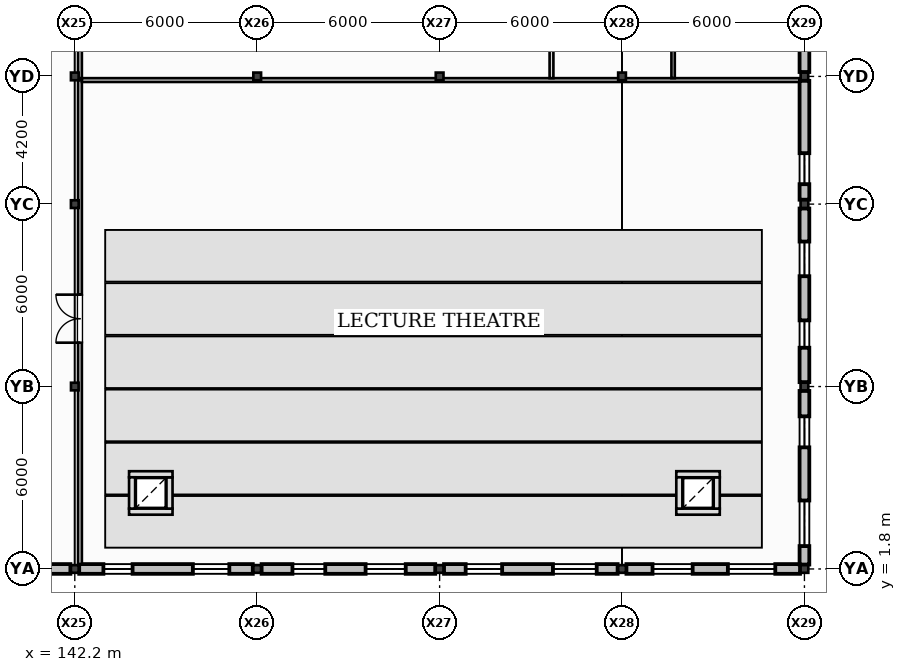
"""IFC4 building model, lengths in metres.
Left out: names, types, materials, properties, quantities, classifications, styles, units other than length and angle.
Written with IfcOpenShell. Run it as: python <this file> out.ifc"""

import sys

from ifc_helpers import new_model, si_unit, direction, frame, frame_2d, origin, origin_2d, place, context, subcontext, project, spatial, rectangle, hollow_rectangle, i_section, extrude, element, fill, save


model = new_model("IFC4")
c1 = context("Model", 3, precision=1e-05, world=origin(), true_north=direction((0.0, 1.0)))
c2 = subcontext(c1, "Body", "Model", "MODEL_VIEW")
j1 = project(units=[si_unit("LENGTHUNIT", "METRE"), si_unit("PLANEANGLEUNIT", "RADIAN")], contexts=[c1])
p1 = place(None, origin())
s1 = spatial("IfcSite", under=j1, at=p1, CompositionType="ELEMENT")
p2 = place(p1, origin())
s2 = spatial("IfcBuilding", under=s1, at=p2, CompositionType="ELEMENT")
p3 = place(p2, frame((0.0, 0.0, 6.0)))
s3 = spatial("IfcBuildingStorey", under=s2, at=p3, CompositionType="ELEMENT", Elevation=6.0)
p4 = place(p3, frame((142.2, 1.8, 0.0), z_axis=(0.0, 0.0, 1.0), x_axis=(1.0, 0.0, 0.0)))
e1 = element("IfcColumn", 1, at=p4, inside=s3, PredefinedType="COLUMN", context=c2, shape_type="SweptSolid", body=[
    extrude(i_section(OverallWidth=0.254, OverallDepth=0.253, WebThickness=0.009, FlangeThickness=0.014, at=origin_2d()), origin(), (0.0, 0.0, 1.0), 4.0),
])
p5 = place(p3, frame((142.2, 7.8, 0.0), z_axis=(0.0, 0.0, 1.0), x_axis=(1.0, 0.0, 0.0)))
e2 = element("IfcColumn", 2, at=p5, inside=s3, PredefinedType="COLUMN", context=c2, shape_type="SweptSolid", body=[
    extrude(hollow_rectangle(XDim=0.25, YDim=0.25, WallThickness=0.012, at=origin_2d()), origin(), (0.0, 0.0, 1.0), 4.0),
])
for number, where, z_axis, x_axis in (
    (3, (142.2, 13.8, 0.0), (0.0, 0.0, 1.0), (1.0, 0.0, 0.0)),
    (4, (142.2, 18.0, 0.0), (0.0, 0.0, 1.0), (1.0, 0.0, 0.0)),
    (5, (148.2, 1.8, 0.0), (0.0, 0.0, 1.0), (1.0, 0.0, 0.0)),
    (6, (148.2, 18.0, 0.0), (0.0, 0.0, 1.0), (1.0, 0.0, 0.0)),
    (7, (154.2, 1.8, 0.0), (0.0, 0.0, 1.0), (1.0, 0.0, 0.0)),
    (8, (154.2, 18.0, 0.0), (0.0, 0.0, 1.0), (1.0, 0.0, 0.0)),
    (9, (160.2, 1.8, 0.0), (0.0, 0.0, 1.0), (1.0, 0.0, 0.0)),
    (10, (160.2, 18.0, 0.0), (0.0, 0.0, 1.0), (1.0, 0.0, 0.0)),
    (11, (166.2, 1.8, 0.0), (0.0, 0.0, 1.0), (1.0, 0.0, 0.0)),
    (12, (166.2, 7.8, 0.0), (0.0, 0.0, 1.0), (1.0, 0.0, 0.0)),
    (13, (166.2, 13.8, 0.0), (0.0, 0.0, 1.0), (1.0, 0.0, 0.0)),
):
    element("IfcColumn", number, at=place(p3, frame(where, z_axis=z_axis, x_axis=x_axis)), inside=s3, PredefinedType="COLUMN", context=c2, shape_type="SweptSolid", body=[
        extrude(i_section(OverallWidth=0.254, OverallDepth=0.253, WebThickness=0.009, FlangeThickness=0.014, at=origin_2d()), origin(), (0.0, 0.0, 1.0), 4.0),
    ])
p6 = place(p3, frame((166.2, 18.0, 0.0), z_axis=(0.0, 0.0, 1.0), x_axis=(1.0, 0.0, 0.0)))
e14 = element("IfcColumn", 14, at=p6, inside=s3, PredefinedType="COLUMN", context=c2, shape_type="SweptSolid", body=[
    extrude(hollow_rectangle(XDim=0.25, YDim=0.25, WallThickness=0.012, at=origin_2d()), origin(), (0.0, 0.0, 1.0), 4.0),
])
p7 = place(p3, frame((136.345, 1.8, 0.0), z_axis=(0.0, 0.0, 1.0), x_axis=(1.0, 0.0, 0.0)))
e15 = element("IfcWall", 15, at=p7, inside=s3, PredefinedType="STANDARD", context=c2, shape_type="SweptSolid", body=[
    extrude(rectangle(XDim=5.71, YDim=0.32, at=frame_2d((2.855, 0.0))), origin(), (0.0, 0.0, 1.0), 3.223),
])
p8 = place(p7, frame((3.504, 0.0, 0.86)))
e16 = element("IfcOpeningElement", 16, at=p8, cuts=e15, PredefinedType="OPENING", context=c2, shape_type="SweptSolid", body=[
    extrude(rectangle(XDim=1.08, YDim=1.08, at=frame_2d((0.54, 0.54))), frame((0.0, 0.17, 0.0), z_axis=(0.0, -1.0, 0.0), x_axis=(1.0, 0.0, 0.0)), (0.0, 0.0, 1.0), 0.34),
])
p9 = place(p3, frame((142.345, 1.8, 0.0), z_axis=(0.0, 0.0, 1.0), x_axis=(1.0, 0.0, 0.0)))
e17 = element("IfcWall", 17, at=p9, inside=s3, PredefinedType="STANDARD", context=c2, shape_type="SweptSolid", body=[
    extrude(rectangle(XDim=5.71, YDim=0.32, at=frame_2d((2.855, 0.0))), origin(), (0.0, 0.0, 1.0), 4.0),
])
p10 = place(p9, frame((0.796, 0.0, 1.28)))
e18 = element("IfcOpeningElement", 18, at=p10, cuts=e17, PredefinedType="OPENING", context=c2, shape_type="SweptSolid", body=[
    extrude(rectangle(XDim=0.96, YDim=0.96, at=frame_2d((0.48, 0.48))), frame((0.0, 0.17, 0.0), z_axis=(0.0, -1.0, 0.0), x_axis=(1.0, 0.0, 0.0)), (0.0, 0.0, 1.0), 0.34),
])
p11 = place(p9, frame((3.738, 0.0, 1.18)))
e19 = element("IfcOpeningElement", 19, at=p11, cuts=e17, PredefinedType="OPENING", context=c2, shape_type="SweptSolid", body=[
    extrude(rectangle(XDim=1.2, YDim=1.2, at=frame_2d((0.6, 0.6))), frame((0.0, 0.17, 0.0), z_axis=(0.0, -1.0, 0.0), x_axis=(1.0, 0.0, 0.0)), (0.0, 0.0, 1.0), 0.34),
])
p12 = place(p3, frame((148.345, 1.8, 0.0), z_axis=(0.0, 0.0, 1.0), x_axis=(1.0, 0.0, 0.0)))
e20 = element("IfcWall", 20, at=p12, inside=s3, PredefinedType="STANDARD", context=c2, shape_type="SweptSolid", body=[
    extrude(rectangle(XDim=5.71, YDim=0.32, at=frame_2d((2.855, 0.0))), origin(), (0.0, 0.0, 1.0), 4.0),
])
p13 = place(p12, frame((1.014, 0.0, 0.86)))
e21 = element("IfcOpeningElement", 21, at=p13, cuts=e20, PredefinedType="OPENING", context=c2, shape_type="SweptSolid", body=[
    extrude(rectangle(XDim=1.08, YDim=1.08, at=frame_2d((0.54, 0.54))), frame((0.0, 0.17, 0.0), z_axis=(0.0, -1.0, 0.0), x_axis=(1.0, 0.0, 0.0)), (0.0, 0.0, 1.0), 0.34),
])
p14 = place(p12, frame((3.42, 0.0, 1.42)))
e22 = element("IfcOpeningElement", 22, at=p14, cuts=e20, PredefinedType="OPENING", context=c2, shape_type="SweptSolid", body=[
    extrude(rectangle(XDim=1.32, YDim=1.32, at=frame_2d((0.66, 0.66))), frame((0.0, 0.17, 0.0), z_axis=(0.0, -1.0, 0.0), x_axis=(1.0, 0.0, 0.0)), (0.0, 0.0, 1.0), 0.34),
])
p15 = place(p3, frame((154.345, 1.8, 0.0), z_axis=(0.0, 0.0, 1.0), x_axis=(1.0, 0.0, 0.0)))
e23 = element("IfcWall", 23, at=p15, inside=s3, PredefinedType="STANDARD", context=c2, shape_type="SweptSolid", body=[
    extrude(rectangle(XDim=5.71, YDim=0.32, at=frame_2d((2.855, 0.0))), origin(), (0.0, 0.0, 1.0), 4.0),
])
p16 = place(p15, frame((0.712, 0.0, 1.18)))
e24 = element("IfcOpeningElement", 24, at=p16, cuts=e23, PredefinedType="OPENING", context=c2, shape_type="SweptSolid", body=[
    extrude(rectangle(XDim=1.2, YDim=1.2, at=frame_2d((0.6, 0.6))), frame((0.0, 0.17, 0.0), z_axis=(0.0, -1.0, 0.0), x_axis=(1.0, 0.0, 0.0)), (0.0, 0.0, 1.0), 0.34),
])
p17 = place(p15, frame((3.582, 0.0, 0.96)))
e25 = element("IfcOpeningElement", 25, at=p17, cuts=e23, PredefinedType="OPENING", context=c2, shape_type="SweptSolid", body=[
    extrude(rectangle(XDim=1.44, YDim=1.44, at=frame_2d((0.72, 0.72))), frame((0.0, 0.17, 0.0), z_axis=(0.0, -1.0, 0.0), x_axis=(1.0, 0.0, 0.0)), (0.0, 0.0, 1.0), 0.34),
])
p18 = place(p3, frame((160.345, 1.8, 0.0), z_axis=(0.0, 0.0, 1.0), x_axis=(1.0, 0.0, 0.0)))
e26 = element("IfcWall", 26, at=p18, inside=s3, PredefinedType="STANDARD", context=c2, shape_type="SweptSolid", body=[
    extrude(rectangle(XDim=5.71, YDim=0.32, at=frame_2d((2.855, 0.0))), origin(), (0.0, 0.0, 1.0), 4.0),
])
p19 = place(p18, frame((0.858, 0.0, 1.42)))
e27 = element("IfcOpeningElement", 27, at=p19, cuts=e26, PredefinedType="OPENING", context=c2, shape_type="SweptSolid", body=[
    extrude(rectangle(XDim=1.32, YDim=1.32, at=frame_2d((0.66, 0.66))), frame((0.0, 0.17, 0.0), z_axis=(0.0, -1.0, 0.0), x_axis=(1.0, 0.0, 0.0)), (0.0, 0.0, 1.0), 0.34),
])
p20 = place(p18, frame((3.336, 0.0, 1.28)))
e28 = element("IfcOpeningElement", 28, at=p20, cuts=e26, PredefinedType="OPENING", context=c2, shape_type="SweptSolid", body=[
    extrude(rectangle(XDim=1.56, YDim=1.56, at=frame_2d((0.78, 0.78))), frame((0.0, 0.17, 0.0), z_axis=(0.0, -1.0, 0.0), x_axis=(1.0, 0.0, 0.0)), (0.0, 0.0, 1.0), 0.34),
])
p21 = place(p3, frame((166.2, 1.945, 0.0), z_axis=(0.0, 0.0, 1.0), x_axis=(0.0, 1.0, 0.0)))
e29 = element("IfcWall", 29, at=p21, inside=s3, PredefinedType="STANDARD", context=c2, shape_type="SweptSolid", body=[
    extrude(rectangle(XDim=5.71, YDim=0.32, at=frame_2d((2.855, 0.0))), origin(), (0.0, 0.0, 1.0), 4.0),
])
p22 = place(p21, frame((0.607, 0.0, 1.28)))
e30 = element("IfcOpeningElement", 30, at=p22, cuts=e29, PredefinedType="OPENING", context=c2, shape_type="SweptSolid", body=[
    extrude(rectangle(XDim=1.5, YDim=1.5, at=frame_2d((0.75, 0.75))), frame((0.0, 0.17, 0.0), z_axis=(0.0, -1.0, 0.0), x_axis=(1.0, 0.0, 0.0)), (0.0, 0.0, 1.0), 0.34),
])
p23 = place(p21, frame((3.855, 0.0, 1.18)))
e31 = element("IfcOpeningElement", 31, at=p23, cuts=e29, PredefinedType="OPENING", context=c2, shape_type="SweptSolid", body=[
    extrude(rectangle(XDim=1.02, YDim=1.02, at=frame_2d((0.51, 0.51))), frame((0.0, 0.17, 0.0), z_axis=(0.0, -1.0, 0.0), x_axis=(1.0, 0.0, 0.0)), (0.0, 0.0, 1.0), 0.34),
])
p24 = place(p3, frame((166.2, 7.945, 0.0), z_axis=(0.0, 0.0, 1.0), x_axis=(0.0, 1.0, 0.0)))
e32 = element("IfcWall", 32, at=p24, inside=s3, PredefinedType="STANDARD", context=c2, shape_type="SweptSolid", body=[
    extrude(rectangle(XDim=5.71, YDim=0.32, at=frame_2d((2.855, 0.0))), origin(), (0.0, 0.0, 1.0), 4.0),
])
p25 = place(p24, frame((1.131, 0.0, 0.86)))
e33 = element("IfcOpeningElement", 33, at=p25, cuts=e32, PredefinedType="OPENING", context=c2, shape_type="SweptSolid", body=[
    extrude(rectangle(XDim=0.9, YDim=0.9, at=frame_2d((0.45, 0.45))), frame((0.0, 0.17, 0.0), z_axis=(0.0, -1.0, 0.0), x_axis=(1.0, 0.0, 0.0)), (0.0, 0.0, 1.0), 0.34),
])
p26 = place(p24, frame((3.483, 0.0, 1.42)))
e34 = element("IfcOpeningElement", 34, at=p26, cuts=e32, PredefinedType="OPENING", context=c2, shape_type="SweptSolid", body=[
    extrude(rectangle(XDim=1.14, YDim=1.14, at=frame_2d((0.57, 0.57))), frame((0.0, 0.17, 0.0), z_axis=(0.0, -1.0, 0.0), x_axis=(1.0, 0.0, 0.0)), (0.0, 0.0, 1.0), 0.34),
])
p27 = place(p3, frame((166.2, 13.945, 0.0), z_axis=(0.0, 0.0, 1.0), x_axis=(0.0, 1.0, 0.0)))
e35 = element("IfcWall", 35, at=p27, inside=s3, PredefinedType="STANDARD", context=c2, shape_type="SweptSolid", body=[
    extrude(rectangle(XDim=3.91, YDim=0.32, at=frame_2d((1.955, 0.0))), origin(), (0.0, 0.0, 1.0), 4.0),
])
p28 = place(p27, frame((0.51, 0.0, 1.18)))
e36 = element("IfcOpeningElement", 36, at=p28, cuts=e35, PredefinedType="OPENING", context=c2, shape_type="SweptSolid", body=[
    extrude(rectangle(XDim=1.02, YDim=1.02, at=frame_2d((0.51, 0.51))), frame((0.0, 0.17, 0.0), z_axis=(0.0, -1.0, 0.0), x_axis=(1.0, 0.0, 0.0)), (0.0, 0.0, 1.0), 0.34),
])
p29 = place(p3, frame((166.2, 18.145, 0.0), z_axis=(0.0, 0.0, 1.0), x_axis=(0.0, 1.0, 0.0)))
e37 = element("IfcWall", 37, at=p29, inside=s3, PredefinedType="STANDARD", context=c2, shape_type="SweptSolid", body=[
    extrude(rectangle(XDim=5.71, YDim=0.32, at=frame_2d((2.855, 0.0))), origin(), (0.0, 0.0, 1.0), 3.157),
])
p30 = place(p29, frame((1.014, 0.0, 1.42)))
e38 = element("IfcOpeningElement", 38, at=p30, cuts=e37, PredefinedType="OPENING", context=c2, shape_type="SweptSolid", body=[
    extrude(rectangle(XDim=1.08, YDim=1.08, at=frame_2d((0.54, 0.54))), frame((0.0, 0.17, 0.0), z_axis=(0.0, -1.0, 0.0), x_axis=(1.0, 0.0, 0.0)), (0.0, 0.0, 1.0), 0.34),
])
p31 = place(p29, frame((3.42, 0.0, 1.28)))
e39 = element("IfcOpeningElement", 39, at=p31, cuts=e37, PredefinedType="OPENING", context=c2, shape_type="SweptSolid", body=[
    extrude(rectangle(XDim=1.32, YDim=1.32, at=frame_2d((0.66, 0.66))), frame((0.0, 0.17, 0.0), z_axis=(0.0, -1.0, 0.0), x_axis=(1.0, 0.0, 0.0)), (0.0, 0.0, 1.0), 0.34),
])
p32 = place(p3, frame((143.985, 3.685, 0.0), z_axis=(0.0, 0.0, 1.0), x_axis=(1.0, 0.0, 0.0)))
e40 = element("IfcWall", 40, at=p32, inside=s3, PredefinedType="PARTITIONING", context=c2, shape_type="SweptSolid", body=[
    extrude(rectangle(XDim=1.43, YDim=0.2, at=frame_2d((0.715, 0.0))), origin(), (0.0, 0.0, 1.0), 3.72),
])
p33 = place(p3, frame((145.315, 3.785, 0.0), z_axis=(0.0, 0.0, 1.0), x_axis=(0.0, 1.0, 0.0)))
e41 = element("IfcWall", 41, at=p33, inside=s3, PredefinedType="PARTITIONING", context=c2, shape_type="SweptSolid", body=[
    extrude(rectangle(XDim=1.03, YDim=0.2, at=frame_2d((0.515, 0.0))), origin(), (0.0, 0.0, 1.0), 3.72),
])
p34 = place(p3, frame((145.415, 4.915, 0.0), z_axis=(0.0, 0.0, 1.0), x_axis=(-1.0, 0.0, 0.0)))
e42 = element("IfcWall", 42, at=p34, inside=s3, PredefinedType="PARTITIONING", context=c2, shape_type="SweptSolid", body=[
    extrude(rectangle(XDim=1.43, YDim=0.2, at=frame_2d((0.715, 0.0))), origin(), (0.0, 0.0, 1.0), 3.72),
])
p35 = place(p3, frame((144.085, 4.815, 0.0), z_axis=(0.0, 0.0, 1.0), x_axis=(0.0, -1.0, 0.0)))
e43 = element("IfcWall", 43, at=p35, inside=s3, PredefinedType="PARTITIONING", context=c2, shape_type="SweptSolid", body=[
    extrude(rectangle(XDim=1.03, YDim=0.2, at=frame_2d((0.515, 0.0))), origin(), (0.0, 0.0, 1.0), 3.72),
])
p36 = place(p3, frame((161.985, 3.685, 0.0), z_axis=(0.0, 0.0, 1.0), x_axis=(1.0, 0.0, 0.0)))
e44 = element("IfcWall", 44, at=p36, inside=s3, PredefinedType="PARTITIONING", context=c2, shape_type="SweptSolid", body=[
    extrude(rectangle(XDim=1.43, YDim=0.2, at=frame_2d((0.715, 0.0))), origin(), (0.0, 0.0, 1.0), 3.72),
])
p37 = place(p3, frame((163.315, 3.785, 0.0), z_axis=(0.0, 0.0, 1.0), x_axis=(0.0, 1.0, 0.0)))
e45 = element("IfcWall", 45, at=p37, inside=s3, PredefinedType="PARTITIONING", context=c2, shape_type="SweptSolid", body=[
    extrude(rectangle(XDim=1.03, YDim=0.2, at=frame_2d((0.515, 0.0))), origin(), (0.0, 0.0, 1.0), 3.72),
])
p38 = place(p3, frame((163.415, 4.915, 0.0), z_axis=(0.0, 0.0, 1.0), x_axis=(-1.0, 0.0, 0.0)))
e46 = element("IfcWall", 46, at=p38, inside=s3, PredefinedType="PARTITIONING", context=c2, shape_type="SweptSolid", body=[
    extrude(rectangle(XDim=1.43, YDim=0.2, at=frame_2d((0.715, 0.0))), origin(), (0.0, 0.0, 1.0), 3.72),
])
p39 = place(p3, frame((162.085, 4.815, 0.0), z_axis=(0.0, 0.0, 1.0), x_axis=(0.0, -1.0, 0.0)))
e47 = element("IfcWall", 47, at=p39, inside=s3, PredefinedType="PARTITIONING", context=c2, shape_type="SweptSolid", body=[
    extrude(rectangle(XDim=1.03, YDim=0.2, at=frame_2d((0.515, 0.0))), origin(), (0.0, 0.0, 1.0), 3.72),
])
p40 = place(p3, frame((142.37, 1.96, 0.0), z_axis=(0.0, 0.0, 1.0), x_axis=(0.0, 1.0, 0.0)))
e48 = element("IfcWall", 48, at=p40, inside=s3, PredefinedType="PARTITIONING", context=c2, shape_type="SweptSolid", body=[
    extrude(rectangle(XDim=15.923, YDim=0.125, at=frame_2d((7.961, 0.0))), origin(), (0.0, 0.0, 1.0), 3.72),
])
p41 = place(p40, frame((7.282, 0.0, 0.0)))
e49 = element("IfcOpeningElement", 49, at=p41, cuts=e48, PredefinedType="OPENING", context=c2, shape_type="SweptSolid", body=[
    extrude(rectangle(XDim=1.58, YDim=2.2, at=frame_2d((0.79, 1.1))), frame((0.0, 0.073, 0.0), z_axis=(0.0, -1.0, 0.0), x_axis=(1.0, 0.0, 0.0)), (0.0, 0.0, 1.0), 0.145),
])
p42 = place(p3, frame((142.433, 17.88, 0.0), z_axis=(0.0, 0.0, 1.0), x_axis=(1.0, 0.0, 0.0)))
e50 = element("IfcWall", 50, at=p42, inside=s3, PredefinedType="PARTITIONING", context=c2, shape_type="SweptSolid", body=[
    extrude(rectangle(XDim=23.607, YDim=0.125, at=frame_2d((11.804, 0.0))), origin(), (0.0, 0.0, 1.0), 3.153),
])
p43 = place(p3, frame((142.37, 17.942, 0.0), z_axis=(0.0, 0.0, 1.0), x_axis=(0.0, 1.0, 0.0)))
e51 = element("IfcWall", 51, at=p43, inside=s3, PredefinedType="PARTITIONING", context=c2, shape_type="SweptSolid", body=[
    extrude(rectangle(XDim=6.22, YDim=0.125, at=frame_2d((3.11, 0.0))), origin(), (0.0, 0.0, 1.0), 3.157),
])
p44 = place(p43, frame((2.408, 0.0, 0.0)))
e52 = element("IfcOpeningElement", 52, at=p44, cuts=e51, PredefinedType="OPENING", context=c2, shape_type="SweptSolid", body=[
    extrude(rectangle(XDim=1.18, YDim=2.16, at=frame_2d((0.59, 1.08))), frame((0.0, 0.073, 0.0), z_axis=(0.0, -1.0, 0.0), x_axis=(1.0, 0.0, 0.0)), (0.0, 0.0, 1.0), 0.145),
])
p45 = place(p3, frame((157.88, 24.097, 0.0), z_axis=(0.0, 0.0, 1.0), x_axis=(0.0, -1.0, 0.0)))
e53 = element("IfcWall", 53, at=p45, inside=s3, PredefinedType="PARTITIONING", context=c2, shape_type="SweptSolid", body=[
    extrude(rectangle(XDim=6.155, YDim=0.125, at=frame_2d((3.078, 0.0))), origin(), (0.0, 0.0, 1.0), 3.379),
])
p46 = place(p3, frame((161.88, 24.105, 0.0), z_axis=(0.0, 0.0, 1.0), x_axis=(0.0, -1.0, 0.0)))
e54 = element("IfcWall", 54, at=p46, inside=s3, PredefinedType="PARTITIONING", context=c2, shape_type="SweptSolid", body=[
    extrude(rectangle(XDim=6.163, YDim=0.11, at=frame_2d((3.081, 0.0))), origin(), (0.0, 0.0, 1.0), 3.43),
])
p47 = place(p10, origin())
e55 = element("IfcWindow", 55, at=p47, inside=s3, PartitioningType="SINGLE_PANEL", PredefinedType="WINDOW", context=c2, shape_type="SweptSolid", body=[
    extrude(rectangle(XDim=0.96, YDim=0.96, at=frame_2d((0.48, 0.48))), frame((0.0, 0.03, 0.0), z_axis=(0.0, -1.0, 0.0), x_axis=(1.0, 0.0, 0.0)), (0.0, 0.0, 1.0), 0.06),
])
fill(e18, e55)
p48 = place(p11, origin())
e56 = element("IfcWindow", 56, at=p48, inside=s3, PartitioningType="SINGLE_PANEL", PredefinedType="WINDOW", context=c2, shape_type="SweptSolid", body=[
    extrude(rectangle(XDim=1.2, YDim=1.2, at=frame_2d((0.6, 0.6))), frame((0.0, 0.03, 0.0), z_axis=(0.0, -1.0, 0.0), x_axis=(1.0, 0.0, 0.0)), (0.0, 0.0, 1.0), 0.06),
])
fill(e19, e56)
p49 = place(p13, origin())
e57 = element("IfcWindow", 57, at=p49, inside=s3, PartitioningType="SINGLE_PANEL", PredefinedType="WINDOW", context=c2, shape_type="SweptSolid", body=[
    extrude(rectangle(XDim=1.08, YDim=1.08, at=frame_2d((0.54, 0.54))), frame((0.0, 0.03, 0.0), z_axis=(0.0, -1.0, 0.0), x_axis=(1.0, 0.0, 0.0)), (0.0, 0.0, 1.0), 0.06),
])
fill(e21, e57)
p50 = place(p14, origin())
e58 = element("IfcWindow", 58, at=p50, inside=s3, PartitioningType="SINGLE_PANEL", PredefinedType="WINDOW", context=c2, shape_type="SweptSolid", body=[
    extrude(rectangle(XDim=1.32, YDim=1.32, at=frame_2d((0.66, 0.66))), frame((0.0, 0.03, 0.0), z_axis=(0.0, -1.0, 0.0), x_axis=(1.0, 0.0, 0.0)), (0.0, 0.0, 1.0), 0.06),
])
fill(e22, e58)
p51 = place(p16, origin())
e59 = element("IfcWindow", 59, at=p51, inside=s3, PartitioningType="SINGLE_PANEL", PredefinedType="WINDOW", context=c2, shape_type="SweptSolid", body=[
    extrude(rectangle(XDim=1.2, YDim=1.2, at=frame_2d((0.6, 0.6))), frame((0.0, 0.03, 0.0), z_axis=(0.0, -1.0, 0.0), x_axis=(1.0, 0.0, 0.0)), (0.0, 0.0, 1.0), 0.06),
])
fill(e24, e59)
p52 = place(p17, origin())
e60 = element("IfcWindow", 60, at=p52, inside=s3, PartitioningType="SINGLE_PANEL", PredefinedType="WINDOW", context=c2, shape_type="SweptSolid", body=[
    extrude(rectangle(XDim=1.44, YDim=1.44, at=frame_2d((0.72, 0.72))), frame((0.0, 0.03, 0.0), z_axis=(0.0, -1.0, 0.0), x_axis=(1.0, 0.0, 0.0)), (0.0, 0.0, 1.0), 0.06),
])
fill(e25, e60)
p53 = place(p19, origin())
e61 = element("IfcWindow", 61, at=p53, inside=s3, PartitioningType="SINGLE_PANEL", PredefinedType="WINDOW", context=c2, shape_type="SweptSolid", body=[
    extrude(rectangle(XDim=1.32, YDim=1.32, at=frame_2d((0.66, 0.66))), frame((0.0, 0.03, 0.0), z_axis=(0.0, -1.0, 0.0), x_axis=(1.0, 0.0, 0.0)), (0.0, 0.0, 1.0), 0.06),
])
fill(e27, e61)
p54 = place(p20, origin())
e62 = element("IfcWindow", 62, at=p54, inside=s3, PartitioningType="SINGLE_PANEL", PredefinedType="WINDOW", context=c2, shape_type="SweptSolid", body=[
    extrude(rectangle(XDim=1.56, YDim=1.56, at=frame_2d((0.78, 0.78))), frame((0.0, 0.03, 0.0), z_axis=(0.0, -1.0, 0.0), x_axis=(1.0, 0.0, 0.0)), (0.0, 0.0, 1.0), 0.06),
])
fill(e28, e62)
p55 = place(p22, origin())
e63 = element("IfcWindow", 63, at=p55, inside=s3, PartitioningType="SINGLE_PANEL", PredefinedType="WINDOW", context=c2, shape_type="SweptSolid", body=[
    extrude(rectangle(XDim=1.5, YDim=1.5, at=frame_2d((0.75, 0.75))), frame((0.0, 0.03, 0.0), z_axis=(0.0, -1.0, 0.0), x_axis=(1.0, 0.0, 0.0)), (0.0, 0.0, 1.0), 0.06),
])
fill(e30, e63)
p56 = place(p23, origin())
e64 = element("IfcWindow", 64, at=p56, inside=s3, PartitioningType="SINGLE_PANEL", PredefinedType="WINDOW", context=c2, shape_type="SweptSolid", body=[
    extrude(rectangle(XDim=1.02, YDim=1.02, at=frame_2d((0.51, 0.51))), frame((0.0, 0.03, 0.0), z_axis=(0.0, -1.0, 0.0), x_axis=(1.0, 0.0, 0.0)), (0.0, 0.0, 1.0), 0.06),
])
fill(e31, e64)
p57 = place(p25, origin())
e65 = element("IfcWindow", 65, at=p57, inside=s3, PartitioningType="SINGLE_PANEL", PredefinedType="WINDOW", context=c2, shape_type="SweptSolid", body=[
    extrude(rectangle(XDim=0.9, YDim=0.9, at=frame_2d((0.45, 0.45))), frame((0.0, 0.03, 0.0), z_axis=(0.0, -1.0, 0.0), x_axis=(1.0, 0.0, 0.0)), (0.0, 0.0, 1.0), 0.06),
])
fill(e33, e65)
p58 = place(p26, origin())
e66 = element("IfcWindow", 66, at=p58, inside=s3, PartitioningType="SINGLE_PANEL", PredefinedType="WINDOW", context=c2, shape_type="SweptSolid", body=[
    extrude(rectangle(XDim=1.14, YDim=1.14, at=frame_2d((0.57, 0.57))), frame((0.0, 0.03, 0.0), z_axis=(0.0, -1.0, 0.0), x_axis=(1.0, 0.0, 0.0)), (0.0, 0.0, 1.0), 0.06),
])
fill(e34, e66)
p59 = place(p28, origin())
e67 = element("IfcWindow", 67, at=p59, inside=s3, PartitioningType="SINGLE_PANEL", PredefinedType="WINDOW", context=c2, shape_type="SweptSolid", body=[
    extrude(rectangle(XDim=1.02, YDim=1.02, at=frame_2d((0.51, 0.51))), frame((0.0, 0.03, 0.0), z_axis=(0.0, -1.0, 0.0), x_axis=(1.0, 0.0, 0.0)), (0.0, 0.0, 1.0), 0.06),
])
fill(e36, e67)
p60 = place(p41, origin())
e68 = element("IfcDoor", 68, at=p60, inside=s3, OperationType="DOUBLE_DOOR_SINGLE_SWING", PredefinedType="DOOR", context=c2, shape_type="SweptSolid", body=[
    extrude(rectangle(XDim=1.58, YDim=2.2, at=frame_2d((0.79, 1.1))), frame((0.0, 0.025, 0.0), z_axis=(0.0, -1.0, 0.0), x_axis=(1.0, 0.0, 0.0)), (0.0, 0.0, 1.0), 0.05),
])
fill(e49, e68)
save(model, sys.argv[1])
